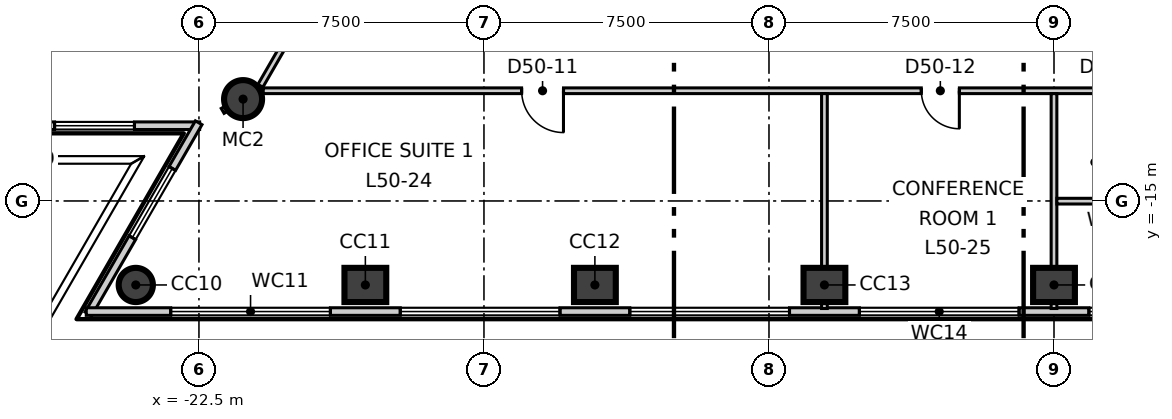
"""IFC4 building model, lengths in metres.
Left out: names, types, materials, properties, quantities, classifications, styles, units other than length and angle.
Written with IfcOpenShell. Run it as: python <this file> out.ifc"""

import sys

from ifc_helpers import new_model, si_unit, direction, frame, frame_2d, origin, origin_2d, place, context, subcontext, project, spatial, rectangle, circle, extrude, element, fill, save


model = new_model("IFC4")
c1 = context("Model", 3, precision=1e-05, world=origin(), true_north=direction((0.0, 1.0)))
c2 = subcontext(c1, "Body", "Model", "MODEL_VIEW")
j1 = project(units=[si_unit("LENGTHUNIT", "METRE"), si_unit("PLANEANGLEUNIT", "RADIAN")], contexts=[c1])
p1 = place(None, origin())
s1 = spatial("IfcSite", under=j1, at=p1, CompositionType="ELEMENT")
p2 = place(p1, origin())
s2 = spatial("IfcBuilding", under=s1, at=p2, CompositionType="ELEMENT")
p3 = place(p2, frame((0.0, 0.0, 215.3)))
s3 = spatial("IfcBuildingStorey", under=s2, at=p3, CompositionType="ELEMENT", Elevation=215.3)
p4 = place(p3, frame((-24.162, -17.21, -0.3), z_axis=(0.0, 0.0, 1.0), x_axis=(1.0, 0.0, 0.0)))
e1 = element("IfcColumn", 1, at=p4, inside=s3, PredefinedType="COLUMN", context=c2, shape_type="SweptSolid", body=[
    extrude(circle(Radius=0.45, at=origin_2d()), origin(), (0.0, 0.0, 1.0), 4.0),
])
for number, where, z_axis, x_axis in (
    (2, (-18.121, -17.21, -0.3), (0.0, 0.0, 1.0), (1.0, 0.0, 0.0)),
    (3, (-12.081, -17.21, -0.3), (0.0, 0.0, 1.0), (1.0, 0.0, 0.0)),
    (4, (-6.041, -17.21, -0.3), (0.0, 0.0, 1.0), (1.0, 0.0, 0.0)),
    (5, (0.0, -17.21, -0.3), (0.0, 0.0, 1.0), (1.0, 0.0, 0.0)),
):
    element("IfcColumn", number, at=place(p3, frame(where, z_axis=z_axis, x_axis=x_axis)), inside=s3, PredefinedType="COLUMN", context=c2, shape_type="SweptSolid", body=[
        extrude(rectangle(XDim=1.1, YDim=0.9, at=origin_2d()), origin(), (0.0, 0.0, 1.0), 4.0),
    ])
p5 = place(p3, frame((-21.339, -12.32, -0.3), z_axis=(0.0, 0.0, 1.0), x_axis=(1.0, 0.0, 0.0)))
e6 = element("IfcColumn", 6, at=p5, inside=s3, PredefinedType="COLUMN", context=c2, shape_type="SweptSolid", body=[
    extrude(circle(Radius=0.5, at=origin_2d()), origin(), (0.0, 0.0, 1.0), 4.0),
])
p6 = place(p3, frame((-2.778, 31.008, 0.0), z_axis=(0.0, 0.0, 1.0), x_axis=(-0.499999612413, -0.866025627558, 0.0)))
e7 = element("IfcWall", 7, at=p6, inside=s3, PredefinedType="ELEMENTEDWALL", context=c2, shape_type="SweptSolid", body=[
    extrude(rectangle(XDim=50.91, YDim=0.2, at=frame_2d((25.455, 0.0))), origin(), (0.0, 0.0, 1.0), 3.7),
])
p7 = place(p6, frame((2.223, 0.0, 0.9)))
e8 = element("IfcOpeningElement", 8, at=p7, cuts=e7, PredefinedType="OPENING", context=c2, shape_type="SweptSolid", body=[
    extrude(rectangle(XDim=4.2, YDim=2.5, at=frame_2d((2.1, 1.25))), frame((0.0, 0.11, 0.0), z_axis=(0.0, -1.0, 0.0), x_axis=(1.0, 0.0, 0.0)), (0.0, 0.0, 1.0), 0.22),
])
p8 = place(p6, frame((8.263, 0.0, 0.9)))
e9 = element("IfcOpeningElement", 9, at=p8, cuts=e7, PredefinedType="OPENING", context=c2, shape_type="SweptSolid", body=[
    extrude(rectangle(XDim=4.2, YDim=2.5, at=frame_2d((2.1, 1.25))), frame((0.0, 0.11, 0.0), z_axis=(0.0, -1.0, 0.0), x_axis=(1.0, 0.0, 0.0)), (0.0, 0.0, 1.0), 0.22),
])
p9 = place(p6, frame((14.304, 0.0, 0.9)))
e10 = element("IfcOpeningElement", 10, at=p9, cuts=e7, PredefinedType="OPENING", context=c2, shape_type="SweptSolid", body=[
    extrude(rectangle(XDim=4.2, YDim=2.5, at=frame_2d((2.1, 1.25))), frame((0.0, 0.11, 0.0), z_axis=(0.0, -1.0, 0.0), x_axis=(1.0, 0.0, 0.0)), (0.0, 0.0, 1.0), 0.22),
])
p10 = place(p6, frame((20.344, 0.0, 0.9)))
e11 = element("IfcOpeningElement", 11, at=p10, cuts=e7, PredefinedType="OPENING", context=c2, shape_type="SweptSolid", body=[
    extrude(rectangle(XDim=4.2, YDim=2.5, at=frame_2d((2.1, 1.25))), frame((0.0, 0.11, 0.0), z_axis=(0.0, -1.0, 0.0), x_axis=(1.0, 0.0, 0.0)), (0.0, 0.0, 1.0), 0.22),
])
p11 = place(p6, frame((26.385, 0.0, 0.9)))
e12 = element("IfcOpeningElement", 12, at=p11, cuts=e7, PredefinedType="OPENING", context=c2, shape_type="SweptSolid", body=[
    extrude(rectangle(XDim=4.2, YDim=2.5, at=frame_2d((2.1, 1.25))), frame((0.0, 0.11, 0.0), z_axis=(0.0, -1.0, 0.0), x_axis=(1.0, 0.0, 0.0)), (0.0, 0.0, 1.0), 0.22),
])
p12 = place(p6, frame((32.425, 0.0, 0.9)))
e13 = element("IfcOpeningElement", 13, at=p12, cuts=e7, PredefinedType="OPENING", context=c2, shape_type="SweptSolid", body=[
    extrude(rectangle(XDim=4.2, YDim=2.5, at=frame_2d((2.1, 1.25))), frame((0.0, 0.11, 0.0), z_axis=(0.0, -1.0, 0.0), x_axis=(1.0, 0.0, 0.0)), (0.0, 0.0, 1.0), 0.22),
])
p13 = place(p6, frame((38.466, 0.0, 0.9)))
e14 = element("IfcOpeningElement", 14, at=p13, cuts=e7, PredefinedType="OPENING", context=c2, shape_type="SweptSolid", body=[
    extrude(rectangle(XDim=4.2, YDim=2.5, at=frame_2d((2.1, 1.25))), frame((0.0, 0.11, 0.0), z_axis=(0.0, -1.0, 0.0), x_axis=(1.0, 0.0, 0.0)), (0.0, 0.0, 1.0), 0.22),
])
p14 = place(p6, frame((44.506, 0.0, 0.9)))
e15 = element("IfcOpeningElement", 15, at=p14, cuts=e7, PredefinedType="OPENING", context=c2, shape_type="SweptSolid", body=[
    extrude(rectangle(XDim=4.2, YDim=2.5, at=frame_2d((2.1, 1.25))), frame((0.0, 0.11, 0.0), z_axis=(0.0, -1.0, 0.0), x_axis=(1.0, 0.0, 0.0)), (0.0, 0.0, 1.0), 0.22),
])
p15 = place(p3, frame((-28.288, -13.02, 0.0), z_axis=(0.0, 0.0, 1.0), x_axis=(1.0, 0.0, 0.0)))
e16 = element("IfcWall", 16, at=p15, inside=s3, PredefinedType="ELEMENTEDWALL", context=c2, shape_type="SweptSolid", body=[
    extrude(rectangle(XDim=5.806, YDim=0.2, at=frame_2d((2.903, 0.0))), origin(), (0.0, 0.0, 1.0), 3.7),
])
p16 = place(p15, frame((1.99, 0.0, 0.9)))
e17 = element("IfcOpeningElement", 17, at=p16, cuts=e16, PredefinedType="OPENING", context=c2, shape_type="SweptSolid", body=[
    extrude(rectangle(XDim=2.1, YDim=2.5, at=frame_2d((1.05, 1.25))), frame((0.0, 0.11, 0.0), z_axis=(0.0, -1.0, 0.0), x_axis=(1.0, 0.0, 0.0)), (0.0, 0.0, 1.0), 0.22),
])
p17 = place(p3, frame((-22.507, -12.942, 0.0), z_axis=(0.0, 0.0, 1.0), x_axis=(-0.499910499212, -0.866077070922, 0.0)))
e18 = element("IfcWall", 18, at=p17, inside=s3, PredefinedType="ELEMENTEDWALL", context=c2, shape_type="SweptSolid", body=[
    extrude(rectangle(XDim=5.807, YDim=0.2, at=frame_2d((2.903, 0.0))), origin(), (0.0, 0.0, 1.0), 3.7),
])
p18 = place(p17, frame((1.39, 0.0, 0.9)))
e19 = element("IfcOpeningElement", 19, at=p18, cuts=e18, PredefinedType="OPENING", context=c2, shape_type="SweptSolid", body=[
    extrude(rectangle(XDim=2.1, YDim=2.5, at=frame_2d((1.05, 1.25))), frame((0.0, 0.11, 0.0), z_axis=(0.0, -1.0, 0.0), x_axis=(1.0, 0.0, 0.0)), (0.0, 0.0, 1.0), 0.22),
])
p19 = place(p3, frame((-25.465, -17.91, 0.0), z_axis=(0.0, 0.0, 1.0), x_axis=(1.0, 0.0, 0.0)))
e20 = element("IfcWall", 20, at=p19, inside=s3, PredefinedType="ELEMENTEDWALL", context=c2, shape_type="SweptSolid", body=[
    extrude(rectangle(XDim=50.91, YDim=0.2, at=frame_2d((25.455, 0.0))), origin(), (0.0, 0.0, 1.0), 3.7),
])
p20 = place(p19, frame((2.223, 0.0, 0.9)))
e21 = element("IfcOpeningElement", 21, at=p20, cuts=e20, PredefinedType="OPENING", context=c2, shape_type="SweptSolid", body=[
    extrude(rectangle(XDim=4.2, YDim=2.5, at=frame_2d((2.1, 1.25))), frame((0.0, 0.11, 0.0), z_axis=(0.0, -1.0, 0.0), x_axis=(1.0, 0.0, 0.0)), (0.0, 0.0, 1.0), 0.22),
])
p21 = place(p19, frame((8.264, 0.0, 0.9)))
e22 = element("IfcOpeningElement", 22, at=p21, cuts=e20, PredefinedType="OPENING", context=c2, shape_type="SweptSolid", body=[
    extrude(rectangle(XDim=4.2, YDim=2.5, at=frame_2d((2.1, 1.25))), frame((0.0, 0.11, 0.0), z_axis=(0.0, -1.0, 0.0), x_axis=(1.0, 0.0, 0.0)), (0.0, 0.0, 1.0), 0.22),
])
p22 = place(p19, frame((14.304, 0.0, 0.9)))
e23 = element("IfcOpeningElement", 23, at=p22, cuts=e20, PredefinedType="OPENING", context=c2, shape_type="SweptSolid", body=[
    extrude(rectangle(XDim=4.2, YDim=2.5, at=frame_2d((2.1, 1.25))), frame((0.0, 0.11, 0.0), z_axis=(0.0, -1.0, 0.0), x_axis=(1.0, 0.0, 0.0)), (0.0, 0.0, 1.0), 0.22),
])
p23 = place(p19, frame((20.345, 0.0, 0.9)))
e24 = element("IfcOpeningElement", 24, at=p23, cuts=e20, PredefinedType="OPENING", context=c2, shape_type="SweptSolid", body=[
    extrude(rectangle(XDim=4.2, YDim=2.5, at=frame_2d((2.1, 1.25))), frame((0.0, 0.11, 0.0), z_axis=(0.0, -1.0, 0.0), x_axis=(1.0, 0.0, 0.0)), (0.0, 0.0, 1.0), 0.22),
])
p24 = place(p19, frame((26.385, 0.0, 0.9)))
e25 = element("IfcOpeningElement", 25, at=p24, cuts=e20, PredefinedType="OPENING", context=c2, shape_type="SweptSolid", body=[
    extrude(rectangle(XDim=4.2, YDim=2.5, at=frame_2d((2.1, 1.25))), frame((0.0, 0.11, 0.0), z_axis=(0.0, -1.0, 0.0), x_axis=(1.0, 0.0, 0.0)), (0.0, 0.0, 1.0), 0.22),
])
p25 = place(p19, frame((32.426, 0.0, 0.9)))
e26 = element("IfcOpeningElement", 26, at=p25, cuts=e20, PredefinedType="OPENING", context=c2, shape_type="SweptSolid", body=[
    extrude(rectangle(XDim=4.2, YDim=2.5, at=frame_2d((2.1, 1.25))), frame((0.0, 0.11, 0.0), z_axis=(0.0, -1.0, 0.0), x_axis=(1.0, 0.0, 0.0)), (0.0, 0.0, 1.0), 0.22),
])
p26 = place(p19, frame((38.466, 0.0, 0.9)))
e27 = element("IfcOpeningElement", 27, at=p26, cuts=e20, PredefinedType="OPENING", context=c2, shape_type="SweptSolid", body=[
    extrude(rectangle(XDim=4.2, YDim=2.5, at=frame_2d((2.1, 1.25))), frame((0.0, 0.11, 0.0), z_axis=(0.0, -1.0, 0.0), x_axis=(1.0, 0.0, 0.0)), (0.0, 0.0, 1.0), 0.22),
])
p27 = place(p19, frame((44.507, 0.0, 0.9)))
e28 = element("IfcOpeningElement", 28, at=p27, cuts=e20, PredefinedType="OPENING", context=c2, shape_type="SweptSolid", body=[
    extrude(rectangle(XDim=4.2, YDim=2.5, at=frame_2d((2.1, 1.25))), frame((0.0, 0.11, 0.0), z_axis=(0.0, -1.0, 0.0), x_axis=(1.0, 0.0, 0.0)), (0.0, 0.0, 1.0), 0.22),
])
p28 = place(p3, frame((-21.876, -12.63, 0.0), z_axis=(0.0, 0.0, 1.0), x_axis=(0.865940358422, 0.500147273966, 0.0)))
e29 = element("IfcWall", 29, at=p28, inside=s3, PredefinedType="PARTITIONING", context=c2, shape_type="SweptSolid", body=[
    extrude(rectangle(XDim=1.061, YDim=0.15, at=frame_2d((0.531, 0.0))), origin(), (0.0, 0.0, 1.0), 3.7),
])
p29 = place(p3, frame((-20.883, -11.97, 0.0), z_axis=(0.0, 0.0, 1.0), x_axis=(0.500006150555, 0.866021852731, 0.0)))
e30 = element("IfcWall", 30, at=p29, inside=s3, PredefinedType="PARTITIONING", context=c2, shape_type="SweptSolid", body=[
    extrude(rectangle(XDim=41.766, YDim=0.15, at=frame_2d((20.883, 0.0))), origin(), (0.0, 0.0, 1.0), 3.7),
])
p30 = place(p29, frame((36.816, 0.0, 0.0)))
e31 = element("IfcOpeningElement", 31, at=p30, cuts=e30, PredefinedType="OPENING", context=c2, shape_type="SweptSolid", body=[
    extrude(rectangle(XDim=1.1, YDim=2.1, at=frame_2d((0.55, 1.05))), frame((0.0, 0.085, 0.0), z_axis=(0.0, -1.0, 0.0), x_axis=(1.0, 0.0, 0.0)), (0.0, 0.0, 1.0), 0.17),
])
p31 = place(p29, frame((23.939, 0.0, 0.0)))
e32 = element("IfcOpeningElement", 32, at=p31, cuts=e30, PredefinedType="OPENING", context=c2, shape_type="SweptSolid", body=[
    extrude(rectangle(XDim=1.1, YDim=2.1, at=frame_2d((0.55, 1.05))), frame((0.0, 0.085, 0.0), z_axis=(0.0, -1.0, 0.0), x_axis=(1.0, 0.0, 0.0)), (0.0, 0.0, 1.0), 0.17),
])
p32 = place(p29, frame((31.139, 0.0, 0.0)))
e33 = element("IfcOpeningElement", 33, at=p32, cuts=e30, PredefinedType="OPENING", context=c2, shape_type="SweptSolid", body=[
    extrude(rectangle(XDim=0.9, YDim=2.1, at=frame_2d((0.45, 1.05))), frame((0.0, 0.085, 0.0), z_axis=(0.0, -1.0, 0.0), x_axis=(1.0, 0.0, 0.0)), (0.0, 0.0, 1.0), 0.17),
])
p33 = place(p29, frame((28.739, 0.0, 0.0)))
e34 = element("IfcOpeningElement", 34, at=p33, cuts=e30, PredefinedType="OPENING", context=c2, shape_type="SweptSolid", body=[
    extrude(rectangle(XDim=0.9, YDim=2.1, at=frame_2d((0.45, 1.05))), frame((0.0, 0.085, 0.0), z_axis=(0.0, -1.0, 0.0), x_axis=(1.0, 0.0, 0.0)), (0.0, 0.0, 1.0), 0.17),
])
p34 = place(p29, frame((14.258, 0.0, 0.0)))
e35 = element("IfcOpeningElement", 35, at=p34, cuts=e30, PredefinedType="OPENING", context=c2, shape_type="SweptSolid", body=[
    extrude(rectangle(XDim=1.1, YDim=2.1, at=frame_2d((0.55, 1.05))), frame((0.0, 0.085, 0.0), z_axis=(0.0, -1.0, 0.0), x_axis=(1.0, 0.0, 0.0)), (0.0, 0.0, 1.0), 0.17),
])
p35 = place(p29, frame((3.777, 0.0, 0.0)))
e36 = element("IfcOpeningElement", 36, at=p35, cuts=e30, PredefinedType="OPENING", context=c2, shape_type="SweptSolid", body=[
    extrude(rectangle(XDim=1.1, YDim=2.1, at=frame_2d((0.55, 1.05))), frame((0.0, 0.085, 0.0), z_axis=(0.0, -1.0, 0.0), x_axis=(1.0, 0.0, 0.0)), (0.0, 0.0, 1.0), 0.17),
])
p36 = place(p3, frame((-20.808, -12.1, 0.0), z_axis=(0.0, 0.0, 1.0), x_axis=(1.0, 0.0, 0.0)))
e37 = element("IfcWall", 37, at=p36, inside=s3, PredefinedType="PARTITIONING", context=c2, shape_type="SweptSolid", body=[
    extrude(rectangle(XDim=41.766, YDim=0.15, at=frame_2d((20.883, 0.0))), origin(), (0.0, 0.0, 1.0), 3.7),
])
p37 = place(p36, frame((6.8, 0.0, 0.0)))
e38 = element("IfcOpeningElement", 38, at=p37, cuts=e37, PredefinedType="OPENING", context=c2, shape_type="SweptSolid", body=[
    extrude(rectangle(XDim=1.1, YDim=2.1, at=frame_2d((0.55, 1.05))), frame((0.0, 0.085, 0.0), z_axis=(0.0, -1.0, 0.0), x_axis=(1.0, 0.0, 0.0)), (0.0, 0.0, 1.0), 0.17),
])
p38 = place(p36, frame((17.317, 0.0, 0.0)))
e39 = element("IfcOpeningElement", 39, at=p38, cuts=e37, PredefinedType="OPENING", context=c2, shape_type="SweptSolid", body=[
    extrude(rectangle(XDim=1.0, YDim=2.1, at=frame_2d((0.5, 1.05))), frame((0.0, 0.085, 0.0), z_axis=(0.0, -1.0, 0.0), x_axis=(1.0, 0.0, 0.0)), (0.0, 0.0, 1.0), 0.17),
])
p39 = place(p36, frame((30.658, 0.0, 0.0)))
e40 = element("IfcOpeningElement", 40, at=p39, cuts=e37, PredefinedType="OPENING", context=c2, shape_type="SweptSolid", body=[
    extrude(rectangle(XDim=1.1, YDim=2.1, at=frame_2d((0.55, 1.05))), frame((0.0, 0.085, 0.0), z_axis=(0.0, -1.0, 0.0), x_axis=(1.0, 0.0, 0.0)), (0.0, 0.0, 1.0), 0.17),
])
p40 = place(p36, frame((21.958, 0.0, 0.0)))
e41 = element("IfcOpeningElement", 41, at=p40, cuts=e37, PredefinedType="OPENING", context=c2, shape_type="SweptSolid", body=[
    extrude(rectangle(XDim=0.9, YDim=2.1, at=frame_2d((0.45, 1.05))), frame((0.0, 0.085, 0.0), z_axis=(0.0, -1.0, 0.0), x_axis=(1.0, 0.0, 0.0)), (0.0, 0.0, 1.0), 0.17),
])
p41 = place(p36, frame((25.158, 0.0, 0.0)))
e42 = element("IfcOpeningElement", 42, at=p41, cuts=e37, PredefinedType="OPENING", context=c2, shape_type="SweptSolid", body=[
    extrude(rectangle(XDim=0.9, YDim=2.1, at=frame_2d((0.45, 1.05))), frame((0.0, 0.085, 0.0), z_axis=(0.0, -1.0, 0.0), x_axis=(1.0, 0.0, 0.0)), (0.0, 0.0, 1.0), 0.17),
])
p42 = place(p36, frame((27.958, 0.0, 0.0)))
e43 = element("IfcOpeningElement", 43, at=p42, cuts=e37, PredefinedType="OPENING", context=c2, shape_type="SweptSolid", body=[
    extrude(rectangle(XDim=1.0, YDim=2.1, at=frame_2d((0.5, 1.05))), frame((0.0, 0.085, 0.0), z_axis=(0.0, -1.0, 0.0), x_axis=(1.0, 0.0, 0.0)), (0.0, 0.0, 1.0), 0.17),
])
p43 = place(p36, frame((36.839, 0.0, 0.0)))
e44 = element("IfcOpeningElement", 44, at=p43, cuts=e37, PredefinedType="OPENING", context=c2, shape_type="SweptSolid", body=[
    extrude(rectangle(XDim=1.0, YDim=2.1, at=frame_2d((0.5, 1.05))), frame((0.0, 0.085, 0.0), z_axis=(0.0, -1.0, 0.0), x_axis=(1.0, 0.0, 0.0)), (0.0, 0.0, 1.0), 0.17),
])
p44 = place(p3, frame((-6.041, -17.83, 0.0), z_axis=(0.0, 0.0, 1.0), x_axis=(0.0, 1.0, 0.0)))
e45 = element("IfcWall", 45, at=p44, inside=s3, PredefinedType="PARTITIONING", context=c2, shape_type="SweptSolid", body=[
    extrude(rectangle(XDim=5.655, YDim=0.15, at=frame_2d((2.828, 0.0))), origin(), (0.0, 0.0, 1.0), 3.7),
])
p45 = place(p3, frame((0.0, -17.83, 0.0), z_axis=(0.0, 0.0, 1.0), x_axis=(0.0, 1.0, 0.0)))
e46 = element("IfcWall", 46, at=p45, inside=s3, PredefinedType="PARTITIONING", context=c2, shape_type="SweptSolid", body=[
    extrude(rectangle(XDim=5.655, YDim=0.15, at=frame_2d((2.828, 0.0))), origin(), (0.0, 0.0, 1.0), 3.2),
])
p46 = place(p3, frame((0.075, -15.005, 0.0), z_axis=(0.0, 0.0, 1.0), x_axis=(1.0, 0.0, 0.0)))
e47 = element("IfcWall", 47, at=p46, inside=s3, PredefinedType="PARTITIONING", context=c2, shape_type="SweptSolid", body=[
    extrude(rectangle(XDim=8.725, YDim=0.15, at=frame_2d((4.363, 0.0))), origin(), (0.0, 0.0, 1.0), 3.7),
])
p47 = place(p3, frame((0.075, 24.07, 0.0), z_axis=(0.0, 0.0, 1.0), x_axis=(0.500006834213, -0.866021458014, 0.0)))
e48 = element("IfcWall", 48, at=p47, inside=s3, PredefinedType="PARTITIONING", context=c2, shape_type="SweptSolid", body=[
    extrude(rectangle(XDim=41.616, YDim=0.15, at=frame_2d((20.808, 0.0))), origin(), (0.0, 0.0, 1.0), 3.7),
])
p48 = place(p47, frame((33.715, 0.0, 0.0)))
e49 = element("IfcOpeningElement", 49, at=p48, cuts=e48, PredefinedType="OPENING", context=c2, shape_type="SweptSolid", body=[
    extrude(rectangle(XDim=1.1, YDim=2.1, at=frame_2d((0.55, 1.05))), frame((0.0, 0.085, 0.0), z_axis=(0.0, -1.0, 0.0), x_axis=(1.0, 0.0, 0.0)), (0.0, 0.0, 1.0), 0.17),
])
p49 = place(p47, frame((22.098, 0.0, 0.0)))
e50 = element("IfcOpeningElement", 50, at=p49, cuts=e48, PredefinedType="OPENING", context=c2, shape_type="SweptSolid", body=[
    extrude(rectangle(XDim=1.0, YDim=2.1, at=frame_2d((0.5, 1.05))), frame((0.0, 0.085, 0.0), z_axis=(0.0, -1.0, 0.0), x_axis=(1.0, 0.0, 0.0)), (0.0, 0.0, 1.0), 0.17),
])
p50 = place(p47, frame((25.198, 0.0, 0.0)))
e51 = element("IfcOpeningElement", 51, at=p50, cuts=e48, PredefinedType="OPENING", context=c2, shape_type="SweptSolid", body=[
    extrude(rectangle(XDim=0.9, YDim=2.1, at=frame_2d((0.45, 1.05))), frame((0.0, 0.085, 0.0), z_axis=(0.0, -1.0, 0.0), x_axis=(1.0, 0.0, 0.0)), (0.0, 0.0, 1.0), 0.17),
])
p51 = place(p47, frame((9.858, 0.0, 0.0)))
e52 = element("IfcOpeningElement", 52, at=p51, cuts=e48, PredefinedType="OPENING", context=c2, shape_type="SweptSolid", body=[
    extrude(rectangle(XDim=1.1, YDim=2.1, at=frame_2d((0.55, 1.05))), frame((0.0, 0.085, 0.0), z_axis=(0.0, -1.0, 0.0), x_axis=(1.0, 0.0, 0.0)), (0.0, 0.0, 1.0), 0.17),
])
p52 = place(p47, frame((18.758, 0.0, 0.0)))
e53 = element("IfcOpeningElement", 53, at=p52, cuts=e48, PredefinedType="OPENING", context=c2, shape_type="SweptSolid", body=[
    extrude(rectangle(XDim=0.9, YDim=2.1, at=frame_2d((0.45, 1.05))), frame((0.0, 0.085, 0.0), z_axis=(0.0, -1.0, 0.0), x_axis=(1.0, 0.0, 0.0)), (0.0, 0.0, 1.0), 0.17),
])
p53 = place(p47, frame((15.558, 0.0, 0.0)))
e54 = element("IfcOpeningElement", 54, at=p53, cuts=e48, PredefinedType="OPENING", context=c2, shape_type="SweptSolid", body=[
    extrude(rectangle(XDim=0.9, YDim=2.1, at=frame_2d((0.45, 1.05))), frame((0.0, 0.085, 0.0), z_axis=(0.0, -1.0, 0.0), x_axis=(1.0, 0.0, 0.0)), (0.0, 0.0, 1.0), 0.17),
])
p54 = place(p47, frame((12.658, 0.0, 0.0)))
e55 = element("IfcOpeningElement", 55, at=p54, cuts=e48, PredefinedType="OPENING", context=c2, shape_type="SweptSolid", body=[
    extrude(rectangle(XDim=1.0, YDim=2.1, at=frame_2d((0.5, 1.05))), frame((0.0, 0.085, 0.0), z_axis=(0.0, -1.0, 0.0), x_axis=(1.0, 0.0, 0.0)), (0.0, 0.0, 1.0), 0.17),
])
p55 = place(p47, frame((3.776, 0.0, 0.0)))
e56 = element("IfcOpeningElement", 56, at=p55, cuts=e48, PredefinedType="OPENING", context=c2, shape_type="SweptSolid", body=[
    extrude(rectangle(XDim=1.1, YDim=2.1, at=frame_2d((0.55, 1.05))), frame((0.0, 0.085, 0.0), z_axis=(0.0, -1.0, 0.0), x_axis=(1.0, 0.0, 0.0)), (0.0, 0.0, 1.0), 0.17),
])
p56 = place(p14, origin())
e57 = element("IfcWindow", 57, at=p56, inside=s3, PartitioningType="SINGLE_PANEL", PredefinedType="WINDOW", context=c2, shape_type="SweptSolid", body=[
    extrude(rectangle(XDim=4.2, YDim=2.5, at=frame_2d((2.1, 1.25))), frame((0.0, 0.03, 0.0), z_axis=(0.0, -1.0, 0.0), x_axis=(1.0, 0.0, 0.0)), (0.0, 0.0, 1.0), 0.06),
])
fill(e15, e57)
p57 = place(p16, origin())
e58 = element("IfcWindow", 58, at=p57, inside=s3, PartitioningType="SINGLE_PANEL", PredefinedType="WINDOW", context=c2, shape_type="SweptSolid", body=[
    extrude(rectangle(XDim=2.1, YDim=2.5, at=frame_2d((1.05, 1.25))), frame((0.0, 0.03, 0.0), z_axis=(0.0, -1.0, 0.0), x_axis=(1.0, 0.0, 0.0)), (0.0, 0.0, 1.0), 0.06),
])
fill(e17, e58)
p58 = place(p18, origin())
e59 = element("IfcWindow", 59, at=p58, inside=s3, PartitioningType="SINGLE_PANEL", PredefinedType="WINDOW", context=c2, shape_type="SweptSolid", body=[
    extrude(rectangle(XDim=2.1, YDim=2.5, at=frame_2d((1.05, 1.25))), frame((0.0, 0.03, 0.0), z_axis=(0.0, -1.0, 0.0), x_axis=(1.0, 0.0, 0.0)), (0.0, 0.0, 1.0), 0.06),
])
fill(e19, e59)
p59 = place(p20, origin())
e60 = element("IfcWindow", 60, at=p59, inside=s3, PartitioningType="SINGLE_PANEL", PredefinedType="WINDOW", context=c2, shape_type="SweptSolid", body=[
    extrude(rectangle(XDim=4.2, YDim=2.5, at=frame_2d((2.1, 1.25))), frame((0.0, 0.03, 0.0), z_axis=(0.0, -1.0, 0.0), x_axis=(1.0, 0.0, 0.0)), (0.0, 0.0, 1.0), 0.06),
])
fill(e21, e60)
p60 = place(p21, origin())
e61 = element("IfcWindow", 61, at=p60, inside=s3, PartitioningType="SINGLE_PANEL", PredefinedType="WINDOW", context=c2, shape_type="SweptSolid", body=[
    extrude(rectangle(XDim=4.2, YDim=2.5, at=frame_2d((2.1, 1.25))), frame((0.0, 0.03, 0.0), z_axis=(0.0, -1.0, 0.0), x_axis=(1.0, 0.0, 0.0)), (0.0, 0.0, 1.0), 0.06),
])
fill(e22, e61)
p61 = place(p22, origin())
e62 = element("IfcWindow", 62, at=p61, inside=s3, PartitioningType="SINGLE_PANEL", PredefinedType="WINDOW", context=c2, shape_type="SweptSolid", body=[
    extrude(rectangle(XDim=4.2, YDim=2.5, at=frame_2d((2.1, 1.25))), frame((0.0, 0.03, 0.0), z_axis=(0.0, -1.0, 0.0), x_axis=(1.0, 0.0, 0.0)), (0.0, 0.0, 1.0), 0.06),
])
fill(e23, e62)
p62 = place(p23, origin())
e63 = element("IfcWindow", 63, at=p62, inside=s3, PartitioningType="SINGLE_PANEL", PredefinedType="WINDOW", context=c2, shape_type="SweptSolid", body=[
    extrude(rectangle(XDim=4.2, YDim=2.5, at=frame_2d((2.1, 1.25))), frame((0.0, 0.03, 0.0), z_axis=(0.0, -1.0, 0.0), x_axis=(1.0, 0.0, 0.0)), (0.0, 0.0, 1.0), 0.06),
])
fill(e24, e63)
p63 = place(p24, origin())
e64 = element("IfcWindow", 64, at=p63, inside=s3, PartitioningType="SINGLE_PANEL", PredefinedType="WINDOW", context=c2, shape_type="SweptSolid", body=[
    extrude(rectangle(XDim=4.2, YDim=2.5, at=frame_2d((2.1, 1.25))), frame((0.0, 0.03, 0.0), z_axis=(0.0, -1.0, 0.0), x_axis=(1.0, 0.0, 0.0)), (0.0, 0.0, 1.0), 0.06),
])
fill(e25, e64)
p64 = place(p37, origin())
e65 = element("IfcDoor", 65, at=p64, inside=s3, OperationType="SINGLE_SWING_RIGHT", PredefinedType="DOOR", context=c2, shape_type="SweptSolid", body=[
    extrude(rectangle(XDim=1.1, YDim=2.1, at=frame_2d((0.55, 1.05))), frame((0.0, 0.025, 0.0), z_axis=(0.0, -1.0, 0.0), x_axis=(1.0, 0.0, 0.0)), (0.0, 0.0, 1.0), 0.05),
])
fill(e38, e65)
p65 = place(p38, origin())
e66 = element("IfcDoor", 66, at=p65, inside=s3, OperationType="SINGLE_SWING_RIGHT", PredefinedType="DOOR", context=c2, shape_type="SweptSolid", body=[
    extrude(rectangle(XDim=1.0, YDim=2.1, at=frame_2d((0.5, 1.05))), frame((0.0, 0.025, 0.0), z_axis=(0.0, -1.0, 0.0), x_axis=(1.0, 0.0, 0.0)), (0.0, 0.0, 1.0), 0.05),
])
fill(e39, e66)
save(model, sys.argv[1])
